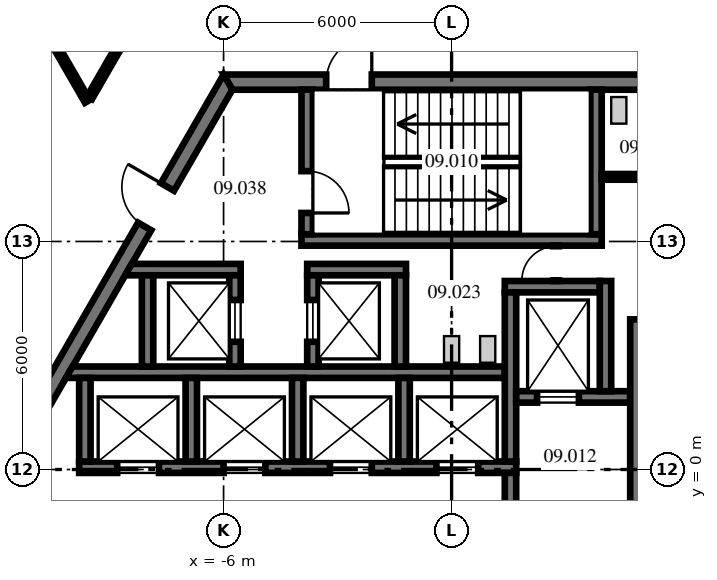
"""IFC4 building model, lengths in metres.
Left out: names, types, materials, properties, quantities, classifications, styles, units other than length and angle.
Written with IfcOpenShell. Run it as: python <this file> out.ifc"""

import sys

from ifc_helpers import new_model, si_unit, direction, frame, frame_2d, origin, place, context, subcontext, project, spatial, polyline, rectangle, outline, extrude, source, transform, mapped, element, fill, save


model = new_model("IFC4")
c1 = context("Model", 3, precision=1e-05, world=origin(), true_north=direction((0.0, 1.0)))
c2 = subcontext(c1, "Body", "Model", "MODEL_VIEW")
j1 = project(units=[si_unit("LENGTHUNIT", "METRE"), si_unit("PLANEANGLEUNIT", "RADIAN")], contexts=[c1])
p1 = place(None, origin())
s1 = spatial("IfcSite", under=j1, at=p1, CompositionType="ELEMENT")
p2 = place(p1, origin())
s2 = spatial("IfcBuilding", under=s1, at=p2, CompositionType="ELEMENT")
p3 = place(p2, frame((0.0, 0.0, 41.8)))
s3 = spatial("IfcBuildingStorey", under=s2, at=p3, CompositionType="ELEMENT", Elevation=41.8)
m1 = source(origin(), c2, "Body", "SweptSolid", [
    extrude(outline(polyline([(-0.115, -0.2), (11.885, -0.2), (11.654, 0.2), (0.115, 0.2), (-0.115, -0.2)])), origin(), (0.0, 0.0, 1.0), 4.1),
])
p4 = place(p3, frame((5.885, 10.192, 0.0), z_axis=(0.0, 0.0, 1.0), x_axis=(-1.0, 0.0, 0.0)))
e1 = element("IfcWall", 1, at=p4, inside=s3, PredefinedType="SHEAR", context=c2, shape_type="MappedRepresentation", body=[
    mapped(m1, transform((0.0, 0.0, 0.0), scale=1.0)),
])
p5 = place(p4, frame((7.985, 0.0, 0.0)))
e2 = element("IfcOpeningElement", 2, at=p5, cuts=e1, PredefinedType="OPENING", context=c2, shape_type="SweptSolid", body=[
    extrude(rectangle(XDim=1.2, YDim=2.1, at=frame_2d((0.6, 1.05))), frame((0.0, 0.21, 0.0), z_axis=(0.0, -1.0, 0.0), x_axis=(1.0, 0.0, 0.0)), (0.0, 0.0, 1.0), 0.42),
])
p6 = place(p3, frame((-5.885, 10.192, 0.0), z_axis=(0.0, 0.0, 1.0), x_axis=(-0.499996592174, -0.866027371285, 0.0)))
e3 = element("IfcWall", 3, at=p6, inside=s3, PredefinedType="SHEAR", context=c2, shape_type="MappedRepresentation", body=[
    mapped(m1, transform((0.0, 0.0, 0.0), scale=1.0)),
])
p7 = place(p6, frame((3.185, 0.0, 0.0)))
e4 = element("IfcOpeningElement", 4, at=p7, cuts=e3, PredefinedType="OPENING", context=c2, shape_type="SweptSolid", body=[
    extrude(rectangle(XDim=1.2, YDim=2.1, at=frame_2d((0.6, 1.05))), frame((0.0, 0.21, 0.0), z_axis=(0.0, -1.0, 0.0), x_axis=(1.0, 0.0, 0.0)), (0.0, 0.0, 1.0), 0.42),
])
p8 = place(p3, frame((-11.769, 0.0, 0.0), z_axis=(0.0, 0.0, 1.0), x_axis=(0.499996592174, -0.866027371285, 0.0)))
e5 = element("IfcWall", 5, at=p8, inside=s3, PredefinedType="SHEAR", context=c2, shape_type="MappedRepresentation", body=[
    mapped(m1, transform((0.0, 0.0, 0.0), scale=1.0)),
])
p9 = place(p8, frame((1.405, 0.0, 0.0)))
e6 = element("IfcOpeningElement", 6, at=p9, cuts=e5, PredefinedType="OPENING", context=c2, shape_type="SweptSolid", body=[
    extrude(rectangle(XDim=1.8, YDim=2.1, at=frame_2d((0.9, 1.05))), frame((0.0, 0.21, 0.0), z_axis=(0.0, -1.0, 0.0), x_axis=(1.0, 0.0, 0.0)), (0.0, 0.0, 1.0), 0.42),
])
p10 = place(p8, frame((7.915, 0.0, 0.0)))
e7 = element("IfcOpeningElement", 7, at=p10, cuts=e5, PredefinedType="OPENING", context=c2, shape_type="SweptSolid", body=[
    extrude(rectangle(XDim=1.2, YDim=2.1, at=frame_2d((0.6, 1.05))), frame((0.0, 0.21, 0.0), z_axis=(0.0, -1.0, 0.0), x_axis=(1.0, 0.0, 0.0)), (0.0, 0.0, 1.0), 0.42),
])
m2 = source(origin(), c2, "Body", "SweptSolid", [
    extrude(rectangle(XDim=11.5, YDim=0.3, at=frame_2d((5.75, 0.0))), origin(), (0.0, 0.0, 1.0), 4.1),
])
p11 = place(p3, frame((-9.8, 0.06, 0.0), z_axis=(0.0, 0.0, 1.0), x_axis=(1.0, 0.0, 0.0)))
e8 = element("IfcWall", 8, at=p11, inside=s3, PredefinedType="SHEAR", context=c2, shape_type="MappedRepresentation", body=[
    mapped(m2, transform((0.0, 0.0, 0.0), scale=1.0)),
])
p12 = place(p11, frame((1.0, 0.0, 0.0)))
e9 = element("IfcOpeningElement", 9, at=p12, cuts=e8, PredefinedType="OPENING", context=c2, shape_type="SweptSolid", body=[
    extrude(rectangle(XDim=1.1, YDim=2.1, at=frame_2d((0.55, 1.05))), frame((0.0, 0.16, 0.0), z_axis=(0.0, -1.0, 0.0), x_axis=(1.0, 0.0, 0.0)), (0.0, 0.0, 1.0), 0.32),
])
p13 = place(p11, frame((3.8, 0.0, 0.0)))
e10 = element("IfcOpeningElement", 10, at=p13, cuts=e8, PredefinedType="OPENING", context=c2, shape_type="SweptSolid", body=[
    extrude(rectangle(XDim=1.1, YDim=2.1, at=frame_2d((0.55, 1.05))), frame((0.0, 0.16, 0.0), z_axis=(0.0, -1.0, 0.0), x_axis=(1.0, 0.0, 0.0)), (0.0, 0.0, 1.0), 0.32),
])
p14 = place(p11, frame((6.6, 0.0, 0.0)))
e11 = element("IfcOpeningElement", 11, at=p14, cuts=e8, PredefinedType="OPENING", context=c2, shape_type="SweptSolid", body=[
    extrude(rectangle(XDim=1.1, YDim=2.1, at=frame_2d((0.55, 1.05))), frame((0.0, 0.16, 0.0), z_axis=(0.0, -1.0, 0.0), x_axis=(1.0, 0.0, 0.0)), (0.0, 0.0, 1.0), 0.32),
])
p15 = place(p11, frame((9.4, 0.0, 0.0)))
e12 = element("IfcOpeningElement", 12, at=p15, cuts=e8, PredefinedType="OPENING", context=c2, shape_type="SweptSolid", body=[
    extrude(rectangle(XDim=1.1, YDim=2.1, at=frame_2d((0.55, 1.05))), frame((0.0, 0.16, 0.0), z_axis=(0.0, -1.0, 0.0), x_axis=(1.0, 0.0, 0.0)), (0.0, 0.0, 1.0), 0.32),
])
m3 = source(origin(), c2, "Body", "SweptSolid", [
    extrude(outline(polyline([(11.2, -0.15), (-0.349, -0.15), (-0.176, 0.15), (11.2, 0.15), (11.2, -0.15)])), origin(), (0.0, 0.0, 1.0), 4.1),
])
p16 = place(p3, frame((-9.8, 2.56, 0.0), z_axis=(0.0, 0.0, 1.0), x_axis=(1.0, 0.0, 0.0)))
e13 = element("IfcWall", 13, at=p16, inside=s3, PredefinedType="SHEAR", context=c2, shape_type="MappedRepresentation", body=[
    mapped(m3, transform((0.0, 0.0, 0.0), scale=1.0)),
])
m4 = source(origin(), c2, "Body", "SweptSolid", [
    extrude(rectangle(XDim=2.5, YDim=0.3, at=frame_2d((1.25, 0.0))), origin(), (0.0, 0.0, 1.0), 4.1),
])
p17 = place(p3, frame((1.4, 4.81, 0.0), z_axis=(0.0, 0.0, 1.0), x_axis=(1.0, 0.0, 0.0)))
e14 = element("IfcWall", 14, at=p17, inside=s3, PredefinedType="SHEAR", context=c2, shape_type="MappedRepresentation", body=[
    mapped(m4, transform((0.0, 0.0, 0.0), scale=1.0)),
])
m5 = source(origin(), c2, "Body", "SweptSolid", [
    extrude(rectangle(XDim=4.45, YDim=0.3, at=frame_2d((2.225, 0.0))), origin(), (0.0, 0.0, 1.0), 4.1),
])
p18 = place(p3, frame((1.55, 0.21, 0.0), z_axis=(0.0, 0.0, 1.0), x_axis=(0.0, 1.0, 0.0)))
e15 = element("IfcWall", 15, at=p18, inside=s3, PredefinedType="SHEAR", context=c2, shape_type="MappedRepresentation", body=[
    mapped(m5, transform((0.0, 0.0, 0.0), scale=1.0)),
])
m6 = source(origin(), c2, "Body", "SweptSolid", [
    extrude(rectangle(XDim=3.0, YDim=0.3, at=frame_2d((1.5, 0.0))), origin(), (0.0, 0.0, 1.0), 4.1),
])
p19 = place(p3, frame((1.7, 1.91, 0.0), z_axis=(0.0, 0.0, 1.0), x_axis=(1.0, 0.0, 0.0)))
e16 = element("IfcWall", 16, at=p19, inside=s3, PredefinedType="SHEAR", context=c2, shape_type="MappedRepresentation", body=[
    mapped(m6, transform((0.0, 0.0, 0.0), scale=1.0)),
])
p20 = place(p19, frame((0.55, 0.0, 0.0)))
e17 = element("IfcOpeningElement", 17, at=p20, cuts=e16, PredefinedType="OPENING", context=c2, shape_type="SweptSolid", body=[
    extrude(rectangle(XDim=1.1, YDim=2.1, at=frame_2d((0.55, 1.05))), frame((0.0, 0.16, 0.0), z_axis=(0.0, -1.0, 0.0), x_axis=(1.0, 0.0, 0.0)), (0.0, 0.0, 1.0), 0.32),
])
m7 = source(origin(), c2, "Body", "SweptSolid", [
    extrude(rectangle(XDim=2.9, YDim=0.3, at=frame_2d((1.45, 0.0))), origin(), (0.0, 0.0, 1.0), 4.1),
])
p21 = place(p3, frame((4.05, 2.06, 0.0), z_axis=(0.0, 0.0, 1.0), x_axis=(0.0, 1.0, 0.0)))
e18 = element("IfcWall", 18, at=p21, inside=s3, PredefinedType="SHEAR", context=c2, shape_type="MappedRepresentation", body=[
    mapped(m7, transform((0.0, 0.0, 0.0), scale=1.0)),
])
m8 = source(origin(), c2, "Body", "SweptSolid", [
    extrude(rectangle(XDim=2.2, YDim=0.3, at=frame_2d((1.1, 0.0))), origin(), (0.0, 0.0, 1.0), 4.1),
])
p22 = place(p3, frame((-9.65, 0.21, 0.0), z_axis=(0.0, 0.0, 1.0), x_axis=(0.0, 1.0, 0.0)))
e19 = element("IfcWall", 19, at=p22, inside=s3, PredefinedType="SHEAR", context=c2, shape_type="MappedRepresentation", body=[
    mapped(m8, transform((0.0, 0.0, 0.0), scale=1.0)),
])
p23 = place(p3, frame((1.55, -3.09, 0.0), z_axis=(0.0, 0.0, 1.0), x_axis=(0.0, 1.0, 0.0)))
e20 = element("IfcWall", 20, at=p23, inside=s3, PredefinedType="SHEAR", context=c2, shape_type="MappedRepresentation", body=[
    mapped(m6, transform((0.0, 0.0, 0.0), scale=1.0)),
])
p24 = place(p23, frame((0.9, 0.0, 0.0)))
e21 = element("IfcOpeningElement", 21, at=p24, cuts=e20, PredefinedType="OPENING", context=c2, shape_type="SweptSolid", body=[
    extrude(rectangle(XDim=1.2, YDim=2.1, at=frame_2d((0.6, 1.05))), frame((0.0, 0.16, 0.0), z_axis=(0.0, -1.0, 0.0), x_axis=(1.0, 0.0, 0.0)), (0.0, 0.0, 1.0), 0.32),
])
m9 = source(origin(), c2, "Body", "SweptSolid", [
    extrude(outline(polyline([(-0.15, -0.15), (9.99, -0.15), (9.99, 0.15), (0.15, 0.15), (-0.15, -0.15)])), origin(), (0.0, 0.0, 1.0), 4.1),
])
p25 = place(p3, frame((4.85, -6.04, 0.0), z_axis=(0.0, 0.0, 1.0), x_axis=(0.0, 1.0, 0.0)))
e22 = element("IfcWall", 22, at=p25, inside=s3, PredefinedType="SHEAR", context=c2, shape_type="MappedRepresentation", body=[
    mapped(m9, transform((0.0, 0.0, 0.0), scale=1.0)),
])
p26 = place(p25, frame((3.19, 0.0, 0.0)))
e23 = element("IfcOpeningElement", 23, at=p26, cuts=e22, PredefinedType="OPENING", context=c2, shape_type="SweptSolid", body=[
    extrude(rectangle(XDim=1.1, YDim=2.1, at=frame_2d((0.55, 1.05))), frame((0.0, 0.16, 0.0), z_axis=(0.0, -1.0, 0.0), x_axis=(1.0, 0.0, 0.0)), (0.0, 0.0, 1.0), 0.32),
])
m10 = source(origin(), c2, "Body", "SweptSolid", [
    extrude(rectangle(XDim=7.9, YDim=0.3, at=frame_2d((3.95, 0.0))), origin(), (0.0, 0.0, 1.0), 4.1),
])
p27 = place(p3, frame((-3.95, 6.04, 0.0), z_axis=(0.0, 0.0, 1.0), x_axis=(1.0, 0.0, 0.0)))
e24 = element("IfcWall", 24, at=p27, inside=s3, PredefinedType="SHEAR", context=c2, shape_type="MappedRepresentation", body=[
    mapped(m10, transform((0.0, 0.0, 0.0), scale=1.0)),
])
m11 = source(origin(), c2, "Body", "SweptSolid", [
    extrude(outline(polyline([(0.0, -0.15), (0.0, 0.15), (3.804, 0.15), (3.804, -0.15), (0.0, -0.15)])), origin(), (0.0, 0.0, 1.0), 4.1),
])
p28 = place(p3, frame((-3.8, 6.19, 0.0), z_axis=(0.0, 0.0, 1.0), x_axis=(0.0, 1.0, 0.0)))
e25 = element("IfcWall", 25, at=p28, inside=s3, PredefinedType="SHEAR", context=c2, shape_type="MappedRepresentation", body=[
    mapped(m11, transform((0.0, 0.0, 0.0), scale=1.0)),
])
p29 = place(p28, frame((0.56, 0.0, 0.0)))
e26 = element("IfcOpeningElement", 26, at=p29, cuts=e25, PredefinedType="OPENING", context=c2, shape_type="SweptSolid", body=[
    extrude(rectangle(XDim=1.1, YDim=2.1, at=frame_2d((0.55, 1.05))), frame((0.0, 0.16, 0.0), z_axis=(0.0, -1.0, 0.0), x_axis=(1.0, 0.0, 0.0)), (0.0, 0.0, 1.0), 0.32),
])
p30 = place(p3, frame((3.8, 6.19, 0.0), z_axis=(0.0, 0.0, 1.0), x_axis=(0.0, 1.0, 0.0)))
e27 = element("IfcWall", 27, at=p30, inside=s3, PredefinedType="SHEAR", context=c2, shape_type="MappedRepresentation", body=[
    mapped(m11, transform((0.0, 0.0, 0.0), scale=1.0)),
])
m12 = source(origin(), c2, "Body", "SweptSolid", [
    extrude(outline(polyline([(2.6, -0.15), (-0.44, -0.15), (-0.267, 0.15), (2.6, 0.15), (2.6, -0.15)])), origin(), (0.0, 0.0, 1.0), 4.1),
])
p31 = place(p3, frame((-8.15, 5.26, 0.0), z_axis=(0.0, 0.0, 1.0), x_axis=(1.0, 0.0, 0.0)))
e28 = element("IfcWall", 28, at=p31, inside=s3, PredefinedType="SHEAR", context=c2, shape_type="MappedRepresentation", body=[
    mapped(m12, transform((0.0, 0.0, 0.0), scale=1.0)),
])
m13 = source(origin(), c2, "Body", "SweptSolid", [
    extrude(rectangle(XDim=2.4, YDim=0.3, at=frame_2d((1.2, 0.0))), origin(), (0.0, 0.0, 1.0), 4.1),
])
p32 = place(p3, frame((-8.0, 2.71, 0.0), z_axis=(0.0, 0.0, 1.0), x_axis=(0.0, 1.0, 0.0)))
e29 = element("IfcWall", 29, at=p32, inside=s3, PredefinedType="SHEAR", context=c2, shape_type="MappedRepresentation", body=[
    mapped(m13, transform((0.0, 0.0, 0.0), scale=1.0)),
])
p33 = place(p3, frame((-5.7, 2.71, 0.0), z_axis=(0.0, 0.0, 1.0), x_axis=(0.0, 1.0, 0.0)))
e30 = element("IfcWall", 30, at=p33, inside=s3, PredefinedType="SHEAR", context=c2, shape_type="MappedRepresentation", body=[
    mapped(m13, transform((0.0, 0.0, 0.0), scale=1.0)),
])
p34 = place(p33, frame((0.65, 0.0, 0.0)))
e31 = element("IfcOpeningElement", 31, at=p34, cuts=e30, PredefinedType="OPENING", context=c2, shape_type="SweptSolid", body=[
    extrude(rectangle(XDim=1.1, YDim=2.1, at=frame_2d((0.55, 1.05))), frame((0.0, 0.16, 0.0), z_axis=(0.0, -1.0, 0.0), x_axis=(1.0, 0.0, 0.0)), (0.0, 0.0, 1.0), 0.32),
])
m14 = source(origin(), c2, "Body", "SweptSolid", [
    extrude(rectangle(XDim=2.6, YDim=0.3, at=frame_2d((1.3, 0.0))), origin(), (0.0, 0.0, 1.0), 4.1),
])
p35 = place(p3, frame((-3.8, 5.26, 0.0), z_axis=(0.0, 0.0, 1.0), x_axis=(1.0, 0.0, 0.0)))
e32 = element("IfcWall", 32, at=p35, inside=s3, PredefinedType="SHEAR", context=c2, shape_type="MappedRepresentation", body=[
    mapped(m14, transform((0.0, 0.0, 0.0), scale=1.0)),
])
p36 = place(p3, frame((-3.65, 2.71, 0.0), z_axis=(0.0, 0.0, 1.0), x_axis=(0.0, 1.0, 0.0)))
e33 = element("IfcWall", 33, at=p36, inside=s3, PredefinedType="SHEAR", context=c2, shape_type="MappedRepresentation", body=[
    mapped(m13, transform((0.0, 0.0, 0.0), scale=1.0)),
])
p37 = place(p36, frame((0.65, 0.0, 0.0)))
e34 = element("IfcOpeningElement", 34, at=p37, cuts=e33, PredefinedType="OPENING", context=c2, shape_type="SweptSolid", body=[
    extrude(rectangle(XDim=1.1, YDim=2.1, at=frame_2d((0.55, 1.05))), frame((0.0, 0.16, 0.0), z_axis=(0.0, -1.0, 0.0), x_axis=(1.0, 0.0, 0.0)), (0.0, 0.0, 1.0), 0.32),
])
p38 = place(p3, frame((-1.35, 2.71, 0.0), z_axis=(0.0, 0.0, 1.0), x_axis=(0.0, 1.0, 0.0)))
e35 = element("IfcWall", 35, at=p38, inside=s3, PredefinedType="SHEAR", context=c2, shape_type="MappedRepresentation", body=[
    mapped(m13, transform((0.0, 0.0, 0.0), scale=1.0)),
])
for number, where, z_axis, x_axis in (
    (36, (-6.85, 0.21, 0.0), (0.0, 0.0, 1.0), (0.0, 1.0, 0.0)),
    (37, (-4.05, 0.21, 0.0), (0.0, 0.0, 1.0), (0.0, 1.0, 0.0)),
    (38, (-1.25, 0.21, 0.0), (0.0, 0.0, 1.0), (0.0, 1.0, 0.0)),
):
    element("IfcWall", number, at=place(p3, frame(where, z_axis=z_axis, x_axis=x_axis)), inside=s3, PredefinedType="SHEAR", context=c2, shape_type="MappedRepresentation", body=[
        mapped(m8, transform((0.0, 0.0, 0.0), scale=1.0)),
    ])
m15 = source(origin(), c2, "Body", "SweptSolid", [
    extrude(outline(polyline([(0.0, -0.075), (0.0, 0.075), (3.102, 0.075), (3.188, -0.075), (0.0, -0.075)])), origin(), (0.0, 0.0, 1.0), 4.1),
])
p39 = place(p3, frame((3.95, 7.7, 0.0), z_axis=(0.0, 0.0, 1.0), x_axis=(1.0, 0.0, 0.0)))
e39 = element("IfcWall", 39, at=p39, inside=s3, PredefinedType="PARTITIONING", context=c2, shape_type="MappedRepresentation", body=[
    mapped(m15, transform((0.0, 0.0, 0.0), scale=1.0)),
])
p40 = place(p39, frame((1.6, 0.0, 0.0)))
e40 = element("IfcOpeningElement", 40, at=p40, cuts=e39, PredefinedType="OPENING", context=c2, shape_type="SweptSolid", body=[
    extrude(rectangle(XDim=0.9, YDim=2.1, at=frame_2d((0.45, 1.05))), frame((0.0, 0.085, 0.0), z_axis=(0.0, -1.0, 0.0), x_axis=(1.0, 0.0, 0.0)), (0.0, 0.0, 1.0), 0.17),
])
m16 = source(origin(), c2, "Body", "SweptSolid", [
    extrude(rectangle(XDim=0.93, YDim=0.15, at=frame_2d((0.465, 0.0))), origin(), (0.0, 0.0, 1.0), 4.1),
])
p41 = place(p3, frame((2.75, 4.96, 0.0), z_axis=(0.0, 0.0, 1.0), x_axis=(0.0, 1.0, 0.0)))
e41 = element("IfcWall", 41, at=p41, inside=s3, PredefinedType="PARTITIONING", context=c2, shape_type="MappedRepresentation", body=[
    mapped(m16, transform((0.0, 0.0, 0.0), scale=1.0)),
])
p42 = place(p41, frame((0.015, 0.0, 0.0)))
e42 = element("IfcOpeningElement", 42, at=p42, cuts=e41, PredefinedType="OPENING", context=c2, shape_type="SweptSolid", body=[
    extrude(rectangle(XDim=0.9, YDim=2.1, at=frame_2d((0.45, 1.05))), frame((0.0, 0.085, 0.0), z_axis=(0.0, -1.0, 0.0), x_axis=(1.0, 0.0, 0.0)), (0.0, 0.0, 1.0), 0.17),
])
m17 = source(origin(), c2, "Body", "SweptSolid", [
    extrude(rectangle(XDim=7.249, YDim=0.15, at=frame_2d((3.625, 0.0))), origin(), (0.0, 0.0, 1.0), 4.1),
])
p43 = place(p3, frame((-13.207, 15.965, 0.0), z_axis=(0.0, 0.0, 1.0), x_axis=(0.500014967241, -0.866016762271, 0.0)))
e43 = element("IfcWall", 43, at=p43, inside=s3, PredefinedType="PARTITIONING", context=c2, shape_type="MappedRepresentation", body=[
    mapped(m17, transform((0.0, 0.0, 0.0), scale=1.0)),
])
p44 = place(p43, frame((3.199, 0.0, 0.0)))
e44 = element("IfcOpeningElement", 44, at=p44, cuts=e43, PredefinedType="OPENING", context=c2, shape_type="SweptSolid", body=[
    extrude(rectangle(XDim=0.9, YDim=2.1, at=frame_2d((0.45, 1.05))), frame((0.0, 0.085, 0.0), z_axis=(0.0, -1.0, 0.0), x_axis=(1.0, 0.0, 0.0)), (0.0, 0.0, 1.0), 0.17),
])
p45 = place(p3, frame((-9.527, 9.783, 0.0), z_axis=(0.0, 0.0, 1.0), x_axis=(0.50001277644, 0.866018027177, 0.0)))
e45 = element("IfcWall", 45, at=p45, inside=s3, PredefinedType="PARTITIONING", context=c2, shape_type="SweptSolid", body=[
    extrude(rectangle(XDim=3.81, YDim=0.15, at=frame_2d((1.905, 0.0))), origin(), (0.0, 0.0, 1.0), 4.1),
])
p46 = place(p5, frame((1.2, 0.0, 0.0), z_axis=(0.0, 0.0, 1.0), x_axis=(-1.0, 0.0, 0.0)))
e46 = element("IfcDoor", 46, at=p46, inside=s3, OperationType="SINGLE_SWING_RIGHT", PredefinedType="DOOR", context=c2, shape_type="SweptSolid", body=[
    extrude(rectangle(XDim=1.2, YDim=2.1, at=frame_2d((0.6, 1.05))), frame((0.0, 0.025, 0.0), z_axis=(0.0, -1.0, 0.0), x_axis=(1.0, 0.0, 0.0)), (0.0, 0.0, 1.0), 0.05),
])
fill(e2, e46)
p47 = place(p7, frame((1.2, 0.0, 0.0), z_axis=(0.0, 0.0, 1.0), x_axis=(-1.0, 0.0, 0.0)))
e47 = element("IfcDoor", 47, at=p47, inside=s3, OperationType="SINGLE_SWING_RIGHT", PredefinedType="DOOR", context=c2, shape_type="SweptSolid", body=[
    extrude(rectangle(XDim=1.2, YDim=2.1, at=frame_2d((0.6, 1.05))), frame((0.0, 0.025, 0.0), z_axis=(0.0, -1.0, 0.0), x_axis=(1.0, 0.0, 0.0)), (0.0, 0.0, 1.0), 0.05),
])
fill(e4, e47)
p48 = place(p29, frame((1.1, 0.0, 0.0), z_axis=(0.0, 0.0, 1.0), x_axis=(-1.0, 0.0, 0.0)))
e48 = element("IfcDoor", 48, at=p48, inside=s3, OperationType="SINGLE_SWING_RIGHT", PredefinedType="DOOR", context=c2, shape_type="SweptSolid", body=[
    extrude(rectangle(XDim=1.1, YDim=2.1, at=frame_2d((0.55, 1.05))), frame((0.0, 0.025, 0.0), z_axis=(0.0, -1.0, 0.0), x_axis=(1.0, 0.0, 0.0)), (0.0, 0.0, 1.0), 0.05),
])
fill(e26, e48)
p49 = place(p42, origin())
e49 = element("IfcDoor", 49, at=p49, inside=s3, OperationType="SINGLE_SWING_LEFT", PredefinedType="DOOR", context=c2, shape_type="SweptSolid", body=[
    extrude(rectangle(XDim=0.9, YDim=2.1, at=frame_2d((0.45, 1.05))), frame((0.0, 0.025, 0.0), z_axis=(0.0, -1.0, 0.0), x_axis=(1.0, 0.0, 0.0)), (0.0, 0.0, 1.0), 0.05),
])
fill(e42, e49)
p50 = place(p12, origin())
e50 = element("IfcDoor", 50, at=p50, inside=s3, OperationType="DOUBLE_DOOR_SLIDING", PredefinedType="DOOR", context=c2, shape_type="SweptSolid", body=[
    extrude(rectangle(XDim=1.1, YDim=2.1, at=frame_2d((0.55, 1.05))), frame((0.0, 0.025, 0.0), z_axis=(0.0, -1.0, 0.0), x_axis=(1.0, 0.0, 0.0)), (0.0, 0.0, 1.0), 0.05),
])
fill(e9, e50)
p51 = place(p13, origin())
e51 = element("IfcDoor", 51, at=p51, inside=s3, OperationType="DOUBLE_DOOR_SLIDING", PredefinedType="DOOR", context=c2, shape_type="SweptSolid", body=[
    extrude(rectangle(XDim=1.1, YDim=2.1, at=frame_2d((0.55, 1.05))), frame((0.0, 0.025, 0.0), z_axis=(0.0, -1.0, 0.0), x_axis=(1.0, 0.0, 0.0)), (0.0, 0.0, 1.0), 0.05),
])
fill(e10, e51)
p52 = place(p14, origin())
e52 = element("IfcDoor", 52, at=p52, inside=s3, OperationType="DOUBLE_DOOR_SLIDING", PredefinedType="DOOR", context=c2, shape_type="SweptSolid", body=[
    extrude(rectangle(XDim=1.1, YDim=2.1, at=frame_2d((0.55, 1.05))), frame((0.0, 0.025, 0.0), z_axis=(0.0, -1.0, 0.0), x_axis=(1.0, 0.0, 0.0)), (0.0, 0.0, 1.0), 0.05),
])
fill(e11, e52)
p53 = place(p15, origin())
e53 = element("IfcDoor", 53, at=p53, inside=s3, OperationType="DOUBLE_DOOR_SLIDING", PredefinedType="DOOR", context=c2, shape_type="SweptSolid", body=[
    extrude(rectangle(XDim=1.1, YDim=2.1, at=frame_2d((0.55, 1.05))), frame((0.0, 0.025, 0.0), z_axis=(0.0, -1.0, 0.0), x_axis=(1.0, 0.0, 0.0)), (0.0, 0.0, 1.0), 0.05),
])
fill(e12, e53)
p54 = place(p20, origin())
e54 = element("IfcDoor", 54, at=p54, inside=s3, OperationType="DOUBLE_DOOR_SLIDING", PredefinedType="DOOR", context=c2, shape_type="SweptSolid", body=[
    extrude(rectangle(XDim=1.1, YDim=2.1, at=frame_2d((0.55, 1.05))), frame((0.0, 0.025, 0.0), z_axis=(0.0, -1.0, 0.0), x_axis=(1.0, 0.0, 0.0)), (0.0, 0.0, 1.0), 0.05),
])
fill(e17, e54)
p55 = place(p34, origin())
e55 = element("IfcDoor", 55, at=p55, inside=s3, OperationType="DOUBLE_DOOR_SLIDING", PredefinedType="DOOR", context=c2, shape_type="SweptSolid", body=[
    extrude(rectangle(XDim=1.1, YDim=2.1, at=frame_2d((0.55, 1.05))), frame((0.0, 0.025, 0.0), z_axis=(0.0, -1.0, 0.0), x_axis=(1.0, 0.0, 0.0)), (0.0, 0.0, 1.0), 0.05),
])
fill(e31, e55)
p56 = place(p37, origin())
e56 = element("IfcDoor", 56, at=p56, inside=s3, OperationType="DOUBLE_DOOR_SLIDING", PredefinedType="DOOR", context=c2, shape_type="SweptSolid", body=[
    extrude(rectangle(XDim=1.1, YDim=2.1, at=frame_2d((0.55, 1.05))), frame((0.0, 0.025, 0.0), z_axis=(0.0, -1.0, 0.0), x_axis=(1.0, 0.0, 0.0)), (0.0, 0.0, 1.0), 0.05),
])
fill(e34, e56)
save(model, sys.argv[1])
